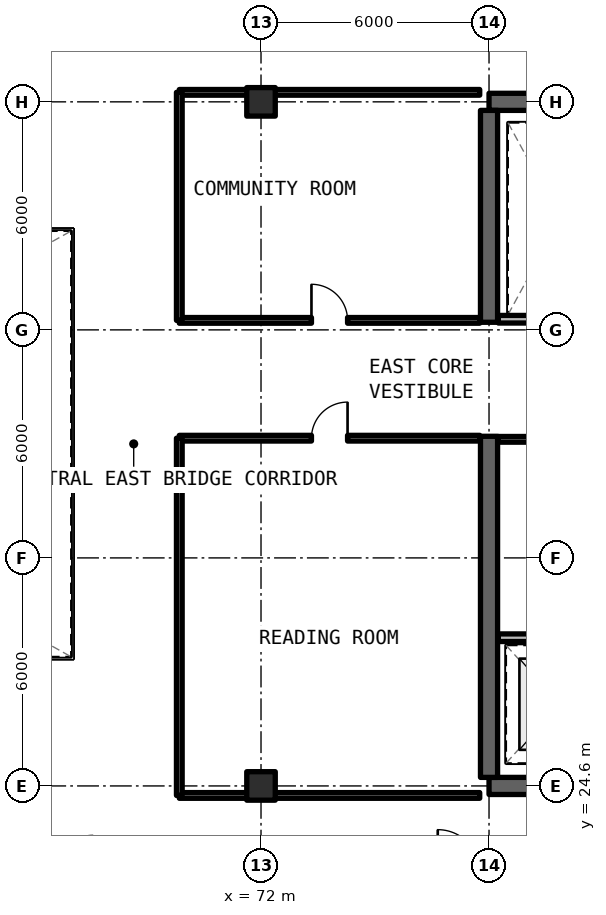
"""IFC4 building model, lengths in metres.
Left out: names, types, materials, properties, quantities, classifications, styles, units other than length and angle.
Written with IfcOpenShell. Run it as: python <this file> out.ifc"""

import sys

from ifc_helpers import new_model, si_unit, direction, frame, frame_2d, origin, origin_2d, place, context, subcontext, project, spatial, rectangle, extrude, element, fill, save


model = new_model("IFC4")
c1 = context("Model", 3, precision=1e-05, world=origin(), true_north=direction((0.0, 1.0)))
c2 = subcontext(c1, "Body", "Model", "MODEL_VIEW")
j1 = project(units=[si_unit("LENGTHUNIT", "METRE"), si_unit("PLANEANGLEUNIT", "RADIAN")], contexts=[c1])
p1 = place(None, origin())
s1 = spatial("IfcSite", under=j1, at=p1, CompositionType="ELEMENT")
p2 = place(p1, origin())
s2 = spatial("IfcBuilding", under=s1, at=p2, CompositionType="ELEMENT")
p3 = place(p2, frame((0.0, 0.0, 222.75)))
s3 = spatial("IfcBuildingStorey", under=s2, at=p3, CompositionType="ELEMENT", Elevation=222.75)
for number, where, z_axis, x_axis in (
    (1, (78.0, 24.6, 0.0), (0.0, 0.0, 1.0), (1.0, 0.0, 0.0)),
    (2, (90.0, 42.6, 0.0), (0.0, 0.0, 1.0), (-1.0, 0.0, 0.0)),
):
    element("IfcWall", number, at=place(p3, frame(where, z_axis=z_axis, x_axis=x_axis)), inside=s3, PredefinedType="SHEAR", context=c2, shape_type="SweptSolid", body=[
        extrude(rectangle(XDim=12.0, YDim=0.45, at=frame_2d((6.0, 0.0))), origin(), (0.0, 0.0, 1.0), 3.3),
    ])
p4 = place(p3, frame((78.0, 24.825, 0.0), z_axis=(0.0, 0.0, 1.0), x_axis=(0.0, 1.0, 0.0)))
e3 = element("IfcWall", 3, at=p4, inside=s3, PredefinedType="SHEAR", context=c2, shape_type="SweptSolid", body=[
    extrude(rectangle(XDim=8.975, YDim=0.45, at=frame_2d((4.488, 0.0))), origin(), (0.0, 0.0, 1.0), 3.3),
])
p5 = place(p3, frame((78.0, 36.8, 0.0), z_axis=(0.0, 0.0, 1.0), x_axis=(0.0, 1.0, 0.0)))
e4 = element("IfcWall", 4, at=p5, inside=s3, PredefinedType="SHEAR", context=c2, shape_type="SweptSolid", body=[
    extrude(rectangle(XDim=5.575, YDim=0.45, at=frame_2d((2.788, 0.0))), origin(), (0.0, 0.0, 1.0), 3.3),
])
for number, where, z_axis, x_axis in (
    (5, (72.0, 24.6, 0.0), (0.0, 0.0, 1.0), (1.0, 0.0, 0.0)),
    (6, (72.0, 42.6, 0.0), (0.0, 0.0, 1.0), (1.0, 0.0, 0.0)),
):
    element("IfcColumn", number, at=place(p3, frame(where, z_axis=z_axis, x_axis=x_axis)), inside=s3, PredefinedType="COLUMN", context=c2, shape_type="SweptSolid", body=[
        extrude(rectangle(XDim=0.75, YDim=0.75, at=origin_2d()), origin(), (0.0, 0.0, 1.0), 3.3),
    ])
p6 = place(p3, frame((78.245, 28.5, 0.0), z_axis=(0.0, 0.0, 1.0), x_axis=(1.0, 0.0, 0.0)))
e7 = element("IfcWall", 7, at=p6, inside=s3, PredefinedType="SOLIDWALL", context=c2, shape_type="SweptSolid", body=[
    extrude(rectangle(XDim=7.585, YDim=0.2, at=frame_2d((3.792, 0.0))), origin(), (0.0, 0.0, 1.0), 2.35),
])
p7 = place(p6, frame((3.555, 0.0, 0.0)))
e8 = element("IfcOpeningElement", 8, at=p7, cuts=e7, PredefinedType="OPENING", context=c2, shape_type="SweptSolid", body=[
    extrude(rectangle(XDim=1.0, YDim=2.15, at=frame_2d((0.5, 1.075))), frame((0.0, 0.11, 0.0), z_axis=(0.0, -1.0, 0.0), x_axis=(1.0, 0.0, 0.0)), (0.0, 0.0, 1.0), 0.22),
])
p8 = place(p3, frame((78.245, 33.72, 0.0), z_axis=(0.0, 0.0, 1.0), x_axis=(1.0, 0.0, 0.0)))
e9 = element("IfcWall", 9, at=p8, inside=s3, PredefinedType="SOLIDWALL", context=c2, shape_type="SweptSolid", body=[
    extrude(rectangle(XDim=3.075, YDim=0.15, at=frame_2d((1.538, 0.0))), origin(), (0.0, 0.0, 1.0), 2.35),
])
p9 = place(p3, frame((78.245, 36.88, 0.0), z_axis=(0.0, 0.0, 1.0), x_axis=(1.0, 0.0, 0.0)))
e10 = element("IfcWall", 10, at=p9, inside=s3, PredefinedType="SOLIDWALL", context=c2, shape_type="SweptSolid", body=[
    extrude(rectangle(XDim=3.075, YDim=0.2, at=frame_2d((1.538, 0.0))), origin(), (0.0, 0.0, 1.0), 2.35),
])
p10 = place(p3, frame((69.85, 24.35, 0.0), z_axis=(0.0, 0.0, 1.0), x_axis=(1.0, 0.0, 0.0)))
e11 = element("IfcWall", 11, at=p10, inside=s3, PredefinedType="SOLIDWALL", context=c2, shape_type="SweptSolid", body=[
    extrude(rectangle(XDim=7.905, YDim=0.15, at=frame_2d((3.952, 0.0))), origin(), (0.0, 0.0, 1.0), 2.35),
])
p11 = place(p3, frame((69.85, 33.75, 0.0), z_axis=(0.0, 0.0, 1.0), x_axis=(1.0, 0.0, 0.0)))
e12 = element("IfcWall", 12, at=p11, inside=s3, PredefinedType="SOLIDWALL", context=c2, shape_type="SweptSolid", body=[
    extrude(rectangle(XDim=7.905, YDim=0.15, at=frame_2d((3.952, 0.0))), origin(), (0.0, 0.0, 1.0), 2.35),
])
p12 = place(p11, frame((3.478, 0.0, 0.0)))
e13 = element("IfcOpeningElement", 13, at=p12, cuts=e12, PredefinedType="OPENING", context=c2, shape_type="SweptSolid", body=[
    extrude(rectangle(XDim=0.95, YDim=2.15, at=frame_2d((0.475, 1.075))), frame((0.0, 0.085, 0.0), z_axis=(0.0, -1.0, 0.0), x_axis=(1.0, 0.0, 0.0)), (0.0, 0.0, 1.0), 0.17),
])
p13 = place(p3, frame((69.85, 24.35, 0.0), z_axis=(0.0, 0.0, 1.0), x_axis=(0.0, 1.0, 0.0)))
e14 = element("IfcWall", 14, at=p13, inside=s3, PredefinedType="SOLIDWALL", context=c2, shape_type="SweptSolid", body=[
    extrude(rectangle(XDim=9.4, YDim=0.15, at=frame_2d((4.7, 0.0))), origin(), (0.0, 0.0, 1.0), 2.35),
])
p14 = place(p3, frame((69.85, 36.85, 0.0), z_axis=(0.0, 0.0, 1.0), x_axis=(1.0, 0.0, 0.0)))
e15 = element("IfcWall", 15, at=p14, inside=s3, PredefinedType="SOLIDWALL", context=c2, shape_type="SweptSolid", body=[
    extrude(rectangle(XDim=7.905, YDim=0.15, at=frame_2d((3.952, 0.0))), origin(), (0.0, 0.0, 1.0), 2.35),
])
p15 = place(p14, frame((3.478, 0.0, 0.0)))
e16 = element("IfcOpeningElement", 16, at=p15, cuts=e15, PredefinedType="OPENING", context=c2, shape_type="SweptSolid", body=[
    extrude(rectangle(XDim=0.95, YDim=2.15, at=frame_2d((0.475, 1.075))), frame((0.0, 0.085, 0.0), z_axis=(0.0, -1.0, 0.0), x_axis=(1.0, 0.0, 0.0)), (0.0, 0.0, 1.0), 0.17),
])
p16 = place(p3, frame((69.85, 42.85, 0.0), z_axis=(0.0, 0.0, 1.0), x_axis=(1.0, 0.0, 0.0)))
e17 = element("IfcWall", 17, at=p16, inside=s3, PredefinedType="SOLIDWALL", context=c2, shape_type="SweptSolid", body=[
    extrude(rectangle(XDim=7.905, YDim=0.15, at=frame_2d((3.952, 0.0))), origin(), (0.0, 0.0, 1.0), 2.35),
])
p17 = place(p3, frame((69.85, 36.85, 0.0), z_axis=(0.0, 0.0, 1.0), x_axis=(0.0, 1.0, 0.0)))
e18 = element("IfcWall", 18, at=p17, inside=s3, PredefinedType="SOLIDWALL", context=c2, shape_type="SweptSolid", body=[
    extrude(rectangle(XDim=6.0, YDim=0.15, at=frame_2d((3.0, 0.0))), origin(), (0.0, 0.0, 1.0), 2.35),
])
p18 = place(p12, origin())
e19 = element("IfcDoor", 19, at=p18, inside=s3, OperationType="SINGLE_SWING_RIGHT", PredefinedType="DOOR", context=c2, shape_type="SweptSolid", body=[
    extrude(rectangle(XDim=0.95, YDim=2.15, at=frame_2d((0.475, 1.075))), frame((0.0, 0.025, 0.0), z_axis=(0.0, -1.0, 0.0), x_axis=(1.0, 0.0, 0.0)), (0.0, 0.0, 1.0), 0.05),
])
fill(e13, e19)
p19 = place(p15, origin())
e20 = element("IfcDoor", 20, at=p19, inside=s3, OperationType="SINGLE_SWING_LEFT", PredefinedType="DOOR", context=c2, shape_type="SweptSolid", body=[
    extrude(rectangle(XDim=0.95, YDim=2.15, at=frame_2d((0.475, 1.075))), frame((0.0, 0.025, 0.0), z_axis=(0.0, -1.0, 0.0), x_axis=(1.0, 0.0, 0.0)), (0.0, 0.0, 1.0), 0.05),
])
fill(e16, e20)
save(model, sys.argv[1])
